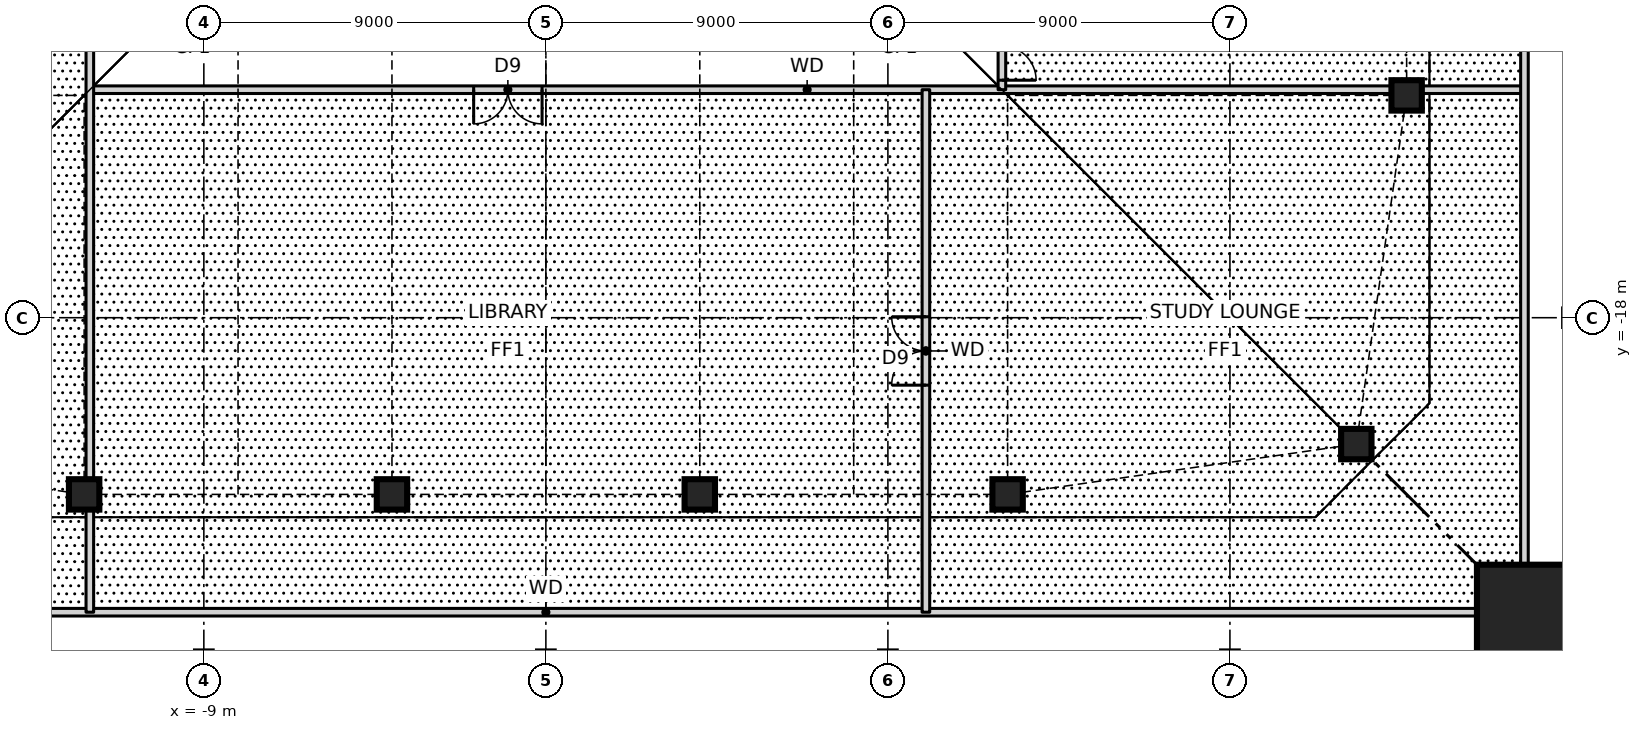
"""IFC4 building model, lengths in metres.
Left out: names, types, materials, properties, quantities, classifications, styles, units other than length and angle.
Written with IfcOpenShell. Run it as: python <this file> out.ifc"""

import sys

from ifc_helpers import new_model, si_unit, direction, frame, frame_2d, origin, origin_2d, place, context, subcontext, project, spatial, rectangle, hollow_rectangle, i_section, extrude, element, fill, save


model = new_model("IFC4")
c1 = context("Model", 3, precision=1e-05, world=origin(), true_north=direction((0.0, 1.0)))
c2 = subcontext(c1, "Body", "Model", "MODEL_VIEW")
j1 = project(units=[si_unit("LENGTHUNIT", "METRE"), si_unit("PLANEANGLEUNIT", "RADIAN")], contexts=[c1])
p1 = place(None, origin())
s1 = spatial("IfcSite", under=j1, at=p1, CompositionType="ELEMENT")
p2 = place(p1, origin())
s2 = spatial("IfcBuilding", under=s1, at=p2, CompositionType="ELEMENT")
p3 = place(p2, frame((0.0, 0.0, 10.5)))
s3 = spatial("IfcBuildingStorey", under=s2, at=p3, CompositionType="ELEMENT", Elevation=10.5)
for number, where, z_axis, x_axis in (
    (1, (-12.15, -22.65, 0.0), (0.0, 0.0, 1.0), (1.0, 0.0, 0.0)),
    (2, (-4.05, -22.65, 0.0), (0.0, 0.0, 1.0), (1.0, 0.0, 0.0)),
    (3, (4.05, -22.65, 0.0), (0.0, 0.0, 1.0), (1.0, 0.0, 0.0)),
    (4, (12.15, -22.65, 0.0), (0.0, 0.0, 1.0), (1.0, 0.0, 0.0)),
    (5, (21.326, -21.326, 0.0), (0.0, 0.0, 1.0), (1.0, 0.0, 0.0)),
    (6, (22.65, -12.15, 0.0), (0.0, 0.0, 1.0), (1.0, 0.0, 0.0)),
):
    element("IfcColumn", number, at=place(p3, frame(where, z_axis=z_axis, x_axis=x_axis)), inside=s3, PredefinedType="COLUMN", context=c2, shape_type="SweptSolid", body=[
        extrude(hollow_rectangle(XDim=0.8, YDim=0.8, WallThickness=0.09, at=origin_2d()), origin(), (0.0, 0.0, 1.0), 4.5),
    ])
p4 = place(p3, frame((27.0, -27.0, 0.0), z_axis=(0.0, 0.0, 1.0), x_axis=(1.0, 0.0, 0.0)))
e7 = element("IfcColumn", 7, at=p4, inside=s3, PredefinedType="COLUMN", context=c2, shape_type="SweptSolid", body=[
    extrude(rectangle(XDim=5.0, YDim=5.0, at=origin_2d()), origin(), (0.0, 0.0, 1.0), 4.5),
    extrude(i_section(OverallWidth=0.478, OverallDepth=0.599, WebThickness=0.1, FlangeThickness=0.14, at=origin_2d()), origin(), (0.0, 0.0, 1.0), 4.5),
])
p5 = place(p3, frame((-25.75, -25.75, 0.0), z_axis=(0.0, 0.0, 1.0), x_axis=(1.0, 0.0, 0.0)))
e8 = element("IfcWall", 8, at=p5, inside=s3, PredefinedType="SOLIDWALL", context=c2, shape_type="SweptSolid", body=[
    extrude(rectangle(XDim=51.5, YDim=0.2, at=frame_2d((25.75, 0.0))), origin(), (0.0, 0.0, 1.0), 4.25),
])
p6 = place(p3, frame((-12.0, -12.0, 0.0), z_axis=(0.0, 0.0, 1.0), x_axis=(1.0, 0.0, 0.0)))
e9 = element("IfcWall", 9, at=p6, inside=s3, PredefinedType="SOLIDWALL", context=c2, shape_type="SweptSolid", body=[
    extrude(rectangle(XDim=37.75, YDim=0.2, at=frame_2d((18.875, 0.0))), origin(), (0.0, 0.0, 1.0), 4.25),
])
p7 = place(p6, frame((10.1, 0.0, 0.0)))
e10 = element("IfcOpeningElement", 10, at=p7, cuts=e9, PredefinedType="OPENING", context=c2, shape_type="SweptSolid", body=[
    extrude(rectangle(XDim=1.8, YDim=2.1, at=frame_2d((0.9, 1.05))), frame((0.0, 0.11, 0.0), z_axis=(0.0, -1.0, 0.0), x_axis=(1.0, 0.0, 0.0)), (0.0, 0.0, 1.0), 0.22),
])
p8 = place(p3, frame((25.75, -25.75, 0.0), z_axis=(0.0, 0.0, 1.0), x_axis=(0.0, 1.0, 0.0)))
e11 = element("IfcWall", 11, at=p8, inside=s3, PredefinedType="SOLIDWALL", context=c2, shape_type="SweptSolid", body=[
    extrude(rectangle(XDim=51.5, YDim=0.2, at=frame_2d((25.75, 0.0))), origin(), (0.0, 0.0, 1.0), 4.25),
])
p9 = place(p3, frame((12.0, -12.0, 0.0), z_axis=(0.0, 0.0, 1.0), x_axis=(0.0, 1.0, 0.0)))
e12 = element("IfcWall", 12, at=p9, inside=s3, PredefinedType="SOLIDWALL", context=c2, shape_type="SweptSolid", body=[
    extrude(rectangle(XDim=37.75, YDim=0.2, at=frame_2d((18.875, 0.0))), origin(), (0.0, 0.0, 1.0), 4.25),
])
p10 = place(p9, frame((11.1, 0.0, 0.0)))
e13 = element("IfcOpeningElement", 13, at=p10, cuts=e12, PredefinedType="OPENING", context=c2, shape_type="SweptSolid", body=[
    extrude(rectangle(XDim=1.8, YDim=2.1, at=frame_2d((0.9, 1.05))), frame((0.0, 0.11, 0.0), z_axis=(0.0, -1.0, 0.0), x_axis=(1.0, 0.0, 0.0)), (0.0, 0.0, 1.0), 0.22),
])
p11 = place(p9, frame((0.25, 0.0, 0.0)))
e14 = element("IfcOpeningElement", 14, at=p11, cuts=e12, PredefinedType="OPENING", context=c2, shape_type="SweptSolid", body=[
    extrude(rectangle(XDim=1.8, YDim=2.1, at=frame_2d((0.9, 1.05))), frame((0.0, 0.11, 0.0), z_axis=(0.0, -1.0, 0.0), x_axis=(1.0, 0.0, 0.0)), (0.0, 0.0, 1.0), 0.22),
])
p12 = place(p3, frame((10.0, -25.75, 0.0), z_axis=(0.0, 0.0, 1.0), x_axis=(0.0, 1.0, 0.0)))
e15 = element("IfcWall", 15, at=p12, inside=s3, PredefinedType="SOLIDWALL", context=c2, shape_type="SweptSolid", body=[
    extrude(rectangle(XDim=13.75, YDim=0.2, at=frame_2d((6.875, 0.0))), origin(), (0.0, 0.0, 1.0), 4.25),
])
p13 = place(p12, frame((5.975, 0.0, 0.0)))
e16 = element("IfcOpeningElement", 16, at=p13, cuts=e15, PredefinedType="OPENING", context=c2, shape_type="SweptSolid", body=[
    extrude(rectangle(XDim=1.8, YDim=2.1, at=frame_2d((0.9, 1.05))), frame((0.0, 0.11, 0.0), z_axis=(0.0, -1.0, 0.0), x_axis=(1.0, 0.0, 0.0)), (0.0, 0.0, 1.0), 0.22),
])
p14 = place(p3, frame((-12.0, -25.75, 0.0), z_axis=(0.0, 0.0, 1.0), x_axis=(0.0, 1.0, 0.0)))
e17 = element("IfcWall", 17, at=p14, inside=s3, PredefinedType="SOLIDWALL", context=c2, shape_type="SweptSolid", body=[
    extrude(rectangle(XDim=37.75, YDim=0.2, at=frame_2d((18.875, 0.0))), origin(), (0.0, 0.0, 1.0), 4.25),
])
p15 = place(p14, frame((24.85, 0.0, 0.0)))
e18 = element("IfcOpeningElement", 18, at=p15, cuts=e17, PredefinedType="OPENING", context=c2, shape_type="SweptSolid", body=[
    extrude(rectangle(XDim=1.8, YDim=2.1, at=frame_2d((0.9, 1.05))), frame((0.0, 0.11, 0.0), z_axis=(0.0, -1.0, 0.0), x_axis=(1.0, 0.0, 0.0)), (0.0, 0.0, 1.0), 0.22),
])
p16 = place(p7, frame((1.8, 0.0, 0.0), z_axis=(0.0, 0.0, 1.0), x_axis=(-1.0, 0.0, 0.0)))
e19 = element("IfcDoor", 19, at=p16, inside=s3, OperationType="DOUBLE_DOOR_SINGLE_SWING", PredefinedType="DOOR", context=c2, shape_type="SweptSolid", body=[
    extrude(rectangle(XDim=1.8, YDim=2.1, at=frame_2d((0.9, 1.05))), frame((0.0, 0.025, 0.0), z_axis=(0.0, -1.0, 0.0), x_axis=(1.0, 0.0, 0.0)), (0.0, 0.0, 1.0), 0.05),
])
fill(e10, e19)
p17 = place(p13, origin())
e20 = element("IfcDoor", 20, at=p17, inside=s3, OperationType="DOUBLE_DOOR_SINGLE_SWING", PredefinedType="DOOR", context=c2, shape_type="SweptSolid", body=[
    extrude(rectangle(XDim=1.8, YDim=2.1, at=frame_2d((0.9, 1.05))), frame((0.0, 0.025, 0.0), z_axis=(0.0, -1.0, 0.0), x_axis=(1.0, 0.0, 0.0)), (0.0, 0.0, 1.0), 0.05),
])
fill(e16, e20)
p18 = place(p11, frame((1.8, 0.0, 0.0), z_axis=(0.0, 0.0, 1.0), x_axis=(-1.0, 0.0, 0.0)))
e21 = element("IfcDoor", 21, at=p18, inside=s3, OperationType="DOUBLE_DOOR_SINGLE_SWING", PredefinedType="DOOR", context=c2, shape_type="SweptSolid", body=[
    extrude(rectangle(XDim=1.8, YDim=2.1, at=frame_2d((0.9, 1.05))), frame((0.0, 0.025, 0.0), z_axis=(0.0, -1.0, 0.0), x_axis=(1.0, 0.0, 0.0)), (0.0, 0.0, 1.0), 0.05),
])
fill(e14, e21)
save(model, sys.argv[1])
